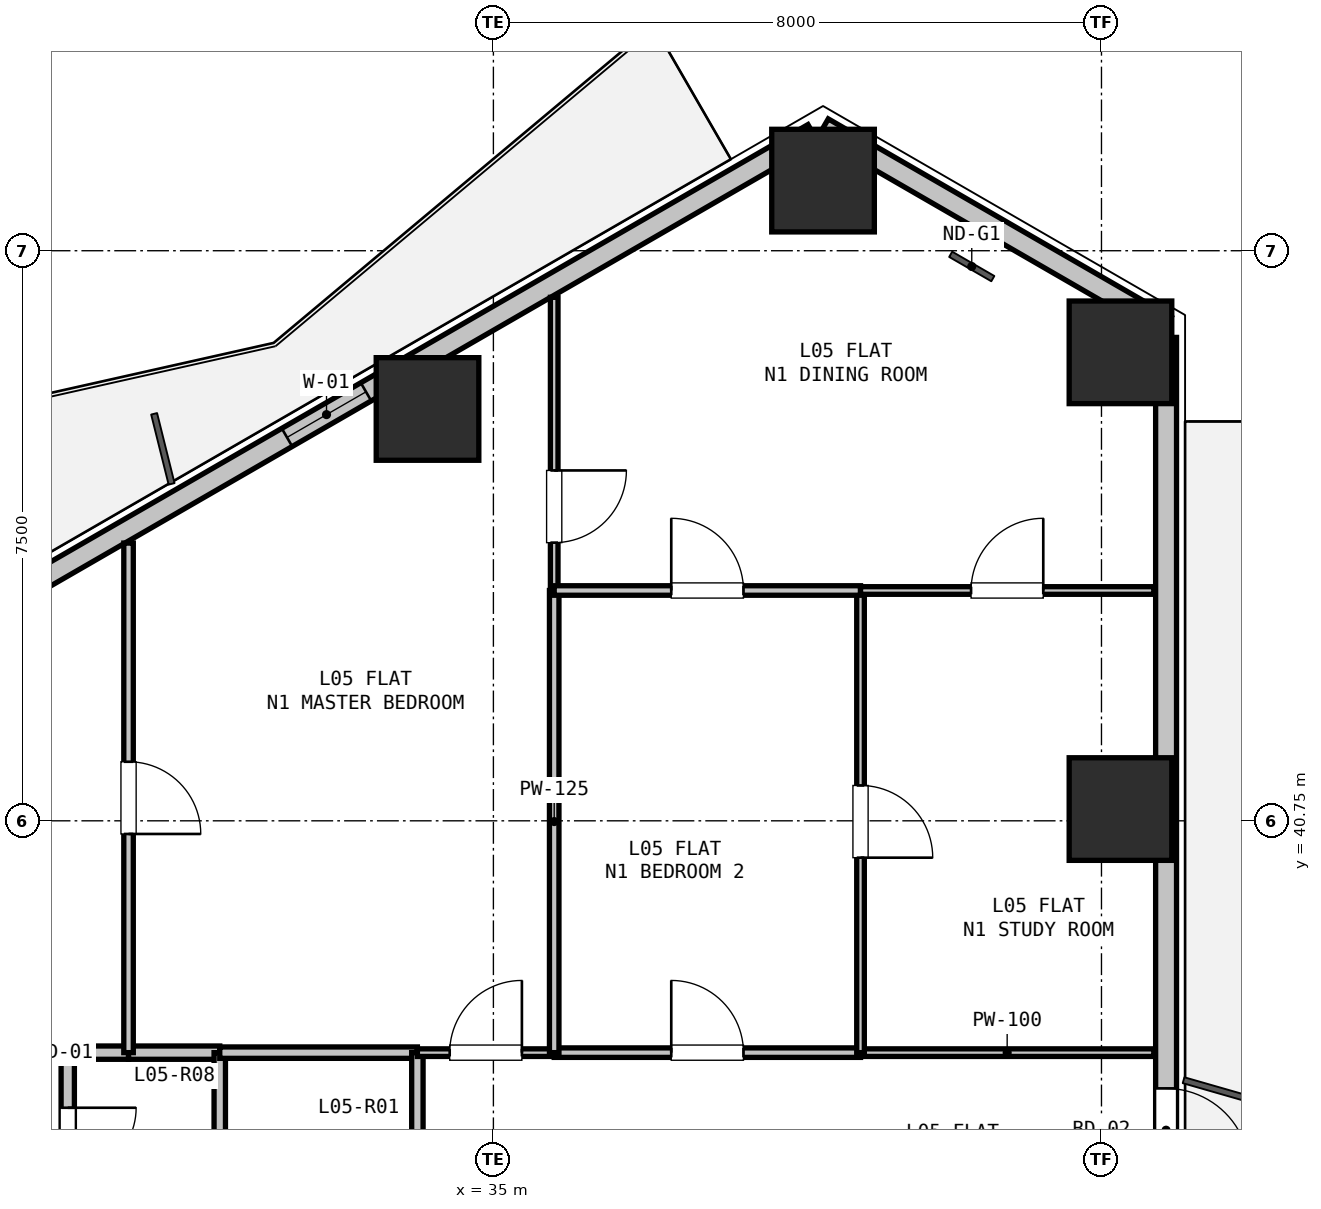
"""IFC4 building model, lengths in metres.
Left out: names, types, materials, properties, quantities, classifications, styles, units other than length and angle.
Written with IfcOpenShell. Run it as: python <this file> out.ifc"""

import sys

from ifc_helpers import new_model, si_unit, direction, frame, frame_2d, origin, origin_2d, place, context, subcontext, project, spatial, rectangle, hollow_rectangle, extrude, element, fill, save


model = new_model("IFC4")
c1 = context("Model", 3, precision=1e-05, world=origin(), true_north=direction((0.0, 1.0)))
c2 = subcontext(c1, "Body", "Model", "MODEL_VIEW")
j1 = project(units=[si_unit("LENGTHUNIT", "METRE"), si_unit("PLANEANGLEUNIT", "RADIAN")], contexts=[c1])
p1 = place(None, origin())
s1 = spatial("IfcSite", under=j1, at=p1, CompositionType="ELEMENT")
p2 = place(p1, origin())
s2 = spatial("IfcBuilding", under=s1, at=p2, CompositionType="ELEMENT")
p3 = place(p2, frame((0.0, 0.0, 22.5)))
s3 = spatial("IfcBuildingStorey", under=s2, at=p3, CompositionType="ELEMENT", Elevation=22.5)
for number, where, z_axis, x_axis in (
    (1, (34.133, 46.168, 0.0), (0.0, 0.0, 1.0), (1.0, 0.0, 0.0)),
    (2, (39.337, 49.173, 0.0), (0.0, 0.0, 1.0), (1.0, 0.0, 0.0)),
    (3, (43.25, 46.913, 0.0), (0.0, 0.0, 1.0), (1.0, 0.0, 0.0)),
    (4, (43.25, 40.905, 0.0), (0.0, 0.0, 1.0), (1.0, 0.0, 0.0)),
):
    element("IfcColumn", number, at=place(p3, frame(where, z_axis=z_axis, x_axis=x_axis)), inside=s3, PredefinedType="COLUMN", context=c2, shape_type="SweptSolid", body=[
        extrude(hollow_rectangle(XDim=1.35, YDim=1.35, WallThickness=0.036, at=origin_2d()), origin(), (0.0, 0.0, 1.0), 3.3),
    ])
p4 = place(p3, frame((39.337, 49.865, 0.0), z_axis=(0.0, 0.0, 1.0), x_axis=(0.866043601342, -0.499968479581, 0.0)))
e5 = element("IfcWall", 5, at=p4, inside=s3, PredefinedType="SOLIDWALL", context=c2, shape_type="SweptSolid", body=[
    extrude(rectangle(XDim=5.211, YDim=0.275, at=frame_2d((2.605, 0.0))), origin(), (0.0, 0.0, 1.0), 2.66),
])
p5 = place(p3, frame((28.232, 43.454, 0.0), z_axis=(0.0, 0.0, 1.0), x_axis=(0.86603192154, 0.499988710747, 0.0)))
e6 = element("IfcWall", 6, at=p5, inside=s3, PredefinedType="SOLIDWALL", context=c2, shape_type="SweptSolid", body=[
    extrude(rectangle(XDim=12.673, YDim=0.275, at=frame_2d((6.336, 0.0))), origin(), (0.0, 0.0, 1.0), 2.66),
])
p6 = place(p5, frame((4.68, 0.0, 0.9)))
e7 = element("IfcOpeningElement", 7, at=p6, cuts=e6, PredefinedType="OPENING", context=c2, shape_type="SweptSolid", body=[
    extrude(rectangle(XDim=1.2, YDim=1.4, at=frame_2d((0.6, 0.7))), frame((0.0, 0.147, 0.0), z_axis=(0.0, -1.0, 0.0), x_axis=(1.0, 0.0, 0.0)), (0.0, 0.0, 1.0), 0.295),
])
p7 = place(p3, frame((43.85, 47.11, 0.0), z_axis=(0.0, 0.0, 1.0), x_axis=(0.0, -1.0, 0.0)))
e8 = element("IfcWall", 8, at=p7, inside=s3, PredefinedType="SOLIDWALL", context=c2, shape_type="SweptSolid", body=[
    extrude(rectangle(XDim=12.673, YDim=0.275, at=frame_2d((6.336, 0.0))), origin(), (0.0, 0.0, 1.0), 2.66),
])
p8 = place(p7, frame((9.88, 0.0, 0.0)))
e9 = element("IfcOpeningElement", 9, at=p8, cuts=e8, PredefinedType="OPENING", context=c2, shape_type="SweptSolid", body=[
    extrude(rectangle(XDim=1.1, YDim=2.1, at=frame_2d((0.55, 1.05))), frame((0.0, 0.147, 0.0), z_axis=(0.0, -1.0, 0.0), x_axis=(1.0, 0.0, 0.0)), (0.0, 0.0, 1.0), 0.295),
])
p9 = place(p3, frame((26.8, 37.7, 0.0), z_axis=(0.0, 0.0, 1.0), x_axis=(1.0, 0.0, 0.0)))
e10 = element("IfcWall", 10, at=p9, inside=s3, PredefinedType="PARTITIONING", context=c2, shape_type="SweptSolid", body=[
    extrude(rectangle(XDim=2.6, YDim=0.1, at=frame_2d((1.3, 0.0))), origin(), (0.0, 0.0, 1.0), 3.04),
])
p10 = place(p9, frame((0.825, 0.0, 0.0)))
e11 = element("IfcOpeningElement", 11, at=p10, cuts=e10, PredefinedType="OPENING", context=c2, shape_type="SweptSolid", body=[
    extrude(rectangle(XDim=0.95, YDim=2.1, at=frame_2d((0.475, 1.05))), frame((0.0, 0.06, 0.0), z_axis=(0.0, -1.0, 0.0), x_axis=(1.0, 0.0, 0.0)), (0.0, 0.0, 1.0), 0.12),
])
p11 = place(p3, frame((29.4, 37.7, 0.0), z_axis=(0.0, 0.0, 1.0), x_axis=(0.0, -1.0, 0.0)))
e12 = element("IfcWall", 12, at=p11, inside=s3, PredefinedType="PLUMBINGWALL", context=c2, shape_type="SweptSolid", body=[
    extrude(rectangle(XDim=2.35, YDim=0.175, at=frame_2d((1.175, 0.0))), origin(), (0.0, 0.0, 1.0), 3.04),
])
p12 = place(p11, frame((0.725, 0.0, 0.0)))
e13 = element("IfcOpeningElement", 13, at=p12, cuts=e12, PredefinedType="OPENING", context=c2, shape_type="SweptSolid", body=[
    extrude(rectangle(XDim=0.9, YDim=2.1, at=frame_2d((0.45, 1.05))), frame((0.0, 0.097, 0.0), z_axis=(0.0, -1.0, 0.0), x_axis=(1.0, 0.0, 0.0)), (0.0, 0.0, 1.0), 0.195),
])
p13 = place(p3, frame((29.4, 37.7, 0.0), z_axis=(0.0, 0.0, 1.0), x_axis=(1.0, 0.0, 0.0)))
e14 = element("IfcWall", 14, at=p13, inside=s3, PredefinedType="PLUMBINGWALL", context=c2, shape_type="SweptSolid", body=[
    extrude(rectangle(XDim=0.8, YDim=0.175, at=frame_2d((0.4, 0.0))), origin(), (0.0, 0.0, 1.0), 3.04),
])
p14 = place(p3, frame((30.2, 37.7, 0.0), z_axis=(0.0, 0.0, 1.0), x_axis=(1.0, 0.0, 0.0)))
e15 = element("IfcWall", 15, at=p14, inside=s3, PredefinedType="PLUMBINGWALL", context=c2, shape_type="SweptSolid", body=[
    extrude(rectangle(XDim=1.2, YDim=0.175, at=frame_2d((0.6, 0.0))), origin(), (0.0, 0.0, 1.0), 3.04),
])
p15 = place(p3, frame((31.4, 37.7, 0.0), z_axis=(0.0, 0.0, 1.0), x_axis=(0.0, -1.0, 0.0)))
e16 = element("IfcWall", 16, at=p15, inside=s3, PredefinedType="PARTITIONING", context=c2, shape_type="SweptSolid", body=[
    extrude(rectangle(XDim=2.35, YDim=0.15, at=frame_2d((1.175, 0.0))), origin(), (0.0, 0.0, 1.0), 3.04),
])
p16 = place(p3, frame((31.4, 37.7, 0.0), z_axis=(0.0, 0.0, 1.0), x_axis=(1.0, 0.0, 0.0)))
e17 = element("IfcWall", 17, at=p16, inside=s3, PredefinedType="PARTITIONING", context=c2, shape_type="SweptSolid", body=[
    extrude(rectangle(XDim=2.6, YDim=0.15, at=frame_2d((1.3, 0.0))), origin(), (0.0, 0.0, 1.0), 3.04),
])
p17 = place(p3, frame((34.0, 37.7, 0.0), z_axis=(0.0, 0.0, 1.0), x_axis=(0.0, -1.0, 0.0)))
e18 = element("IfcWall", 18, at=p17, inside=s3, PredefinedType="PARTITIONING", context=c2, shape_type="SweptSolid", body=[
    extrude(rectangle(XDim=2.35, YDim=0.15, at=frame_2d((1.175, 0.0))), origin(), (0.0, 0.0, 1.0), 3.04),
])
p18 = place(p3, frame((34.0, 37.7, 0.0), z_axis=(0.0, 0.0, 1.0), x_axis=(1.0, 0.0, 0.0)))
e19 = element("IfcWall", 19, at=p18, inside=s3, PredefinedType="PARTITIONING", context=c2, shape_type="SweptSolid", body=[
    extrude(rectangle(XDim=1.8, YDim=0.1, at=frame_2d((0.9, 0.0))), origin(), (0.0, 0.0, 1.0), 3.04),
])
p19 = place(p18, frame((0.425, 0.0, 0.0)))
e20 = element("IfcOpeningElement", 20, at=p19, cuts=e19, PredefinedType="OPENING", context=c2, shape_type="SweptSolid", body=[
    extrude(rectangle(XDim=0.95, YDim=2.1, at=frame_2d((0.475, 1.05))), frame((0.0, 0.06, 0.0), z_axis=(0.0, -1.0, 0.0), x_axis=(1.0, 0.0, 0.0)), (0.0, 0.0, 1.0), 0.12),
])
p20 = place(p3, frame((35.8, 37.7, 0.0), z_axis=(0.0, 0.0, 1.0), x_axis=(1.0, 0.0, 0.0)))
e21 = element("IfcWall", 21, at=p20, inside=s3, PredefinedType="PARTITIONING", context=c2, shape_type="SweptSolid", body=[
    extrude(rectangle(XDim=4.03, YDim=0.125, at=frame_2d((2.015, 0.0))), origin(), (0.0, 0.0, 1.0), 2.337),
])
p21 = place(p20, frame((1.54, 0.0, 0.0)))
e22 = element("IfcOpeningElement", 22, at=p21, cuts=e21, PredefinedType="OPENING", context=c2, shape_type="SweptSolid", body=[
    extrude(rectangle(XDim=0.95, YDim=2.1, at=frame_2d((0.475, 1.05))), frame((0.0, 0.073, 0.0), z_axis=(0.0, -1.0, 0.0), x_axis=(1.0, 0.0, 0.0)), (0.0, 0.0, 1.0), 0.145),
])
p22 = place(p3, frame((39.83, 37.7, 0.0), z_axis=(0.0, 0.0, 1.0), x_axis=(1.0, 0.0, 0.0)))
e23 = element("IfcWall", 23, at=p22, inside=s3, PredefinedType="PARTITIONING", context=c2, shape_type="SweptSolid", body=[
    extrude(rectangle(XDim=3.858, YDim=0.1, at=frame_2d((1.929, 0.0))), origin(), (0.0, 0.0, 1.0), 2.337),
])
p23 = place(p3, frame((30.2, 44.404, 0.0), z_axis=(0.0, 0.0, 1.0), x_axis=(0.0, -1.0, 0.0)))
e24 = element("IfcWall", 24, at=p23, inside=s3, PredefinedType="PARTITIONING", context=c2, shape_type="SweptSolid", body=[
    extrude(rectangle(XDim=6.704, YDim=0.125, at=frame_2d((3.352, 0.0))), origin(), (0.0, 0.0, 1.0), 2.365),
])
p24 = place(p23, frame((2.877, 0.0, 0.0)))
e25 = element("IfcOpeningElement", 25, at=p24, cuts=e24, PredefinedType="OPENING", context=c2, shape_type="SweptSolid", body=[
    extrude(rectangle(XDim=0.95, YDim=2.1, at=frame_2d((0.475, 1.05))), frame((0.0, 0.073, 0.0), z_axis=(0.0, -1.0, 0.0), x_axis=(1.0, 0.0, 0.0)), (0.0, 0.0, 1.0), 0.145),
])
p25 = place(p3, frame((35.8, 47.637, 0.0), z_axis=(0.0, 0.0, 1.0), x_axis=(0.0, -1.0, 0.0)))
e26 = element("IfcWall", 26, at=p25, inside=s3, PredefinedType="PARTITIONING", context=c2, shape_type="SweptSolid", body=[
    extrude(rectangle(XDim=3.857, YDim=0.1, at=frame_2d((1.928, 0.0))), origin(), (0.0, 0.0, 1.0), 2.65),
])
p26 = place(p25, frame((2.277, 0.0, 0.0)))
e27 = element("IfcOpeningElement", 27, at=p26, cuts=e26, PredefinedType="OPENING", context=c2, shape_type="SweptSolid", body=[
    extrude(rectangle(XDim=0.95, YDim=2.1, at=frame_2d((0.475, 1.05))), frame((0.0, 0.06, 0.0), z_axis=(0.0, -1.0, 0.0), x_axis=(1.0, 0.0, 0.0)), (0.0, 0.0, 1.0), 0.12),
])
p27 = place(p3, frame((35.8, 43.78, 0.0), z_axis=(0.0, 0.0, 1.0), x_axis=(0.0, -1.0, 0.0)))
e28 = element("IfcWall", 28, at=p27, inside=s3, PredefinedType="PARTITIONING", context=c2, shape_type="SweptSolid", body=[
    extrude(rectangle(XDim=6.08, YDim=0.125, at=frame_2d((3.04, 0.0))), origin(), (0.0, 0.0, 1.0), 3.04),
])
p28 = place(p3, frame((39.83, 43.78, 0.0), z_axis=(0.0, 0.0, 1.0), x_axis=(0.0, -1.0, 0.0)))
e29 = element("IfcWall", 29, at=p28, inside=s3, PredefinedType="PARTITIONING", context=c2, shape_type="SweptSolid", body=[
    extrude(rectangle(XDim=6.08, YDim=0.1, at=frame_2d((3.04, 0.0))), origin(), (0.0, 0.0, 1.0), 3.04),
])
p29 = place(p28, frame((2.565, 0.0, 0.0)))
e30 = element("IfcOpeningElement", 30, at=p29, cuts=e29, PredefinedType="OPENING", context=c2, shape_type="SweptSolid", body=[
    extrude(rectangle(XDim=0.95, YDim=2.1, at=frame_2d((0.475, 1.05))), frame((0.0, 0.06, 0.0), z_axis=(0.0, -1.0, 0.0), x_axis=(1.0, 0.0, 0.0)), (0.0, 0.0, 1.0), 0.12),
])
p30 = place(p3, frame((35.8, 43.78, 0.0), z_axis=(0.0, 0.0, 1.0), x_axis=(1.0, 0.0, 0.0)))
e31 = element("IfcWall", 31, at=p30, inside=s3, PredefinedType="PARTITIONING", context=c2, shape_type="SweptSolid", body=[
    extrude(rectangle(XDim=4.03, YDim=0.125, at=frame_2d((2.015, 0.0))), origin(), (0.0, 0.0, 1.0), 2.337),
])
p31 = place(p30, frame((1.54, 0.0, 0.0)))
e32 = element("IfcOpeningElement", 32, at=p31, cuts=e31, PredefinedType="OPENING", context=c2, shape_type="SweptSolid", body=[
    extrude(rectangle(XDim=0.95, YDim=2.1, at=frame_2d((0.475, 1.05))), frame((0.0, 0.073, 0.0), z_axis=(0.0, -1.0, 0.0), x_axis=(1.0, 0.0, 0.0)), (0.0, 0.0, 1.0), 0.145),
])
p32 = place(p3, frame((39.83, 43.78, 0.0), z_axis=(0.0, 0.0, 1.0), x_axis=(1.0, 0.0, 0.0)))
e33 = element("IfcWall", 33, at=p32, inside=s3, PredefinedType="PARTITIONING", context=c2, shape_type="SweptSolid", body=[
    extrude(rectangle(XDim=3.858, YDim=0.1, at=frame_2d((1.929, 0.0))), origin(), (0.0, 0.0, 1.0), 2.65),
])
p33 = place(p32, frame((1.454, 0.0, 0.0)))
e34 = element("IfcOpeningElement", 34, at=p33, cuts=e33, PredefinedType="OPENING", context=c2, shape_type="SweptSolid", body=[
    extrude(rectangle(XDim=0.95, YDim=2.1, at=frame_2d((0.475, 1.05))), frame((0.0, 0.06, 0.0), z_axis=(0.0, -1.0, 0.0), x_axis=(1.0, 0.0, 0.0)), (0.0, 0.0, 1.0), 0.12),
])
p34 = place(p6, origin())
e35 = element("IfcWindow", 35, at=p34, inside=s3, PartitioningType="SINGLE_PANEL", PredefinedType="WINDOW", context=c2, shape_type="SweptSolid", body=[
    extrude(rectangle(XDim=1.2, YDim=1.4, at=frame_2d((0.6, 0.7))), frame((0.0, 0.03, 0.0), z_axis=(0.0, -1.0, 0.0), x_axis=(1.0, 0.0, 0.0)), (0.0, 0.0, 1.0), 0.06),
])
fill(e7, e35)
p35 = place(p8, origin())
e36 = element("IfcDoor", 36, at=p35, inside=s3, OperationType="SINGLE_SWING_RIGHT", PredefinedType="DOOR", context=c2, shape_type="SweptSolid", body=[
    extrude(rectangle(XDim=1.1, YDim=2.1, at=frame_2d((0.55, 1.05))), frame((0.0, 0.025, 0.0), z_axis=(0.0, -1.0, 0.0), x_axis=(1.0, 0.0, 0.0)), (0.0, 0.0, 1.0), 0.05),
])
fill(e9, e36)
p36 = place(p12, origin())
e37 = element("IfcDoor", 37, at=p36, inside=s3, OperationType="SINGLE_SWING_LEFT", PredefinedType="DOOR", context=c2, shape_type="SweptSolid", body=[
    extrude(rectangle(XDim=0.9, YDim=2.1, at=frame_2d((0.45, 1.05))), frame((0.0, 0.025, 0.0), z_axis=(0.0, -1.0, 0.0), x_axis=(1.0, 0.0, 0.0)), (0.0, 0.0, 1.0), 0.05),
])
fill(e13, e37)
p37 = place(p19, origin())
e38 = element("IfcDoor", 38, at=p37, inside=s3, OperationType="SINGLE_SWING_RIGHT", PredefinedType="DOOR", context=c2, shape_type="SweptSolid", body=[
    extrude(rectangle(XDim=0.95, YDim=2.1, at=frame_2d((0.475, 1.05))), frame((0.0, 0.025, 0.0), z_axis=(0.0, -1.0, 0.0), x_axis=(1.0, 0.0, 0.0)), (0.0, 0.0, 1.0), 0.05),
])
fill(e20, e38)
p38 = place(p21, origin())
e39 = element("IfcDoor", 39, at=p38, inside=s3, OperationType="SINGLE_SWING_LEFT", PredefinedType="DOOR", context=c2, shape_type="SweptSolid", body=[
    extrude(rectangle(XDim=0.95, YDim=2.1, at=frame_2d((0.475, 1.05))), frame((0.0, 0.025, 0.0), z_axis=(0.0, -1.0, 0.0), x_axis=(1.0, 0.0, 0.0)), (0.0, 0.0, 1.0), 0.05),
])
fill(e22, e39)
p39 = place(p24, origin())
e40 = element("IfcDoor", 40, at=p39, inside=s3, OperationType="SINGLE_SWING_RIGHT", PredefinedType="DOOR", context=c2, shape_type="SweptSolid", body=[
    extrude(rectangle(XDim=0.95, YDim=2.1, at=frame_2d((0.475, 1.05))), frame((0.0, 0.025, 0.0), z_axis=(0.0, -1.0, 0.0), x_axis=(1.0, 0.0, 0.0)), (0.0, 0.0, 1.0), 0.05),
])
fill(e25, e40)
p40 = place(p26, origin())
e41 = element("IfcDoor", 41, at=p40, inside=s3, OperationType="SINGLE_SWING_LEFT", PredefinedType="DOOR", context=c2, shape_type="SweptSolid", body=[
    extrude(rectangle(XDim=0.95, YDim=2.1, at=frame_2d((0.475, 1.05))), frame((0.0, 0.025, 0.0), z_axis=(0.0, -1.0, 0.0), x_axis=(1.0, 0.0, 0.0)), (0.0, 0.0, 1.0), 0.05),
])
fill(e27, e41)
p41 = place(p29, origin())
e42 = element("IfcDoor", 42, at=p41, inside=s3, OperationType="SINGLE_SWING_RIGHT", PredefinedType="DOOR", context=c2, shape_type="SweptSolid", body=[
    extrude(rectangle(XDim=0.95, YDim=2.1, at=frame_2d((0.475, 1.05))), frame((0.0, 0.025, 0.0), z_axis=(0.0, -1.0, 0.0), x_axis=(1.0, 0.0, 0.0)), (0.0, 0.0, 1.0), 0.05),
])
fill(e30, e42)
p42 = place(p31, origin())
e43 = element("IfcDoor", 43, at=p42, inside=s3, OperationType="SINGLE_SWING_LEFT", PredefinedType="DOOR", context=c2, shape_type="SweptSolid", body=[
    extrude(rectangle(XDim=0.95, YDim=2.1, at=frame_2d((0.475, 1.05))), frame((0.0, 0.025, 0.0), z_axis=(0.0, -1.0, 0.0), x_axis=(1.0, 0.0, 0.0)), (0.0, 0.0, 1.0), 0.05),
])
fill(e32, e43)
p43 = place(p33, origin())
e44 = element("IfcDoor", 44, at=p43, inside=s3, OperationType="SINGLE_SWING_RIGHT", PredefinedType="DOOR", context=c2, shape_type="SweptSolid", body=[
    extrude(rectangle(XDim=0.95, YDim=2.1, at=frame_2d((0.475, 1.05))), frame((0.0, 0.025, 0.0), z_axis=(0.0, -1.0, 0.0), x_axis=(1.0, 0.0, 0.0)), (0.0, 0.0, 1.0), 0.05),
])
fill(e34, e44)
save(model, sys.argv[1])
